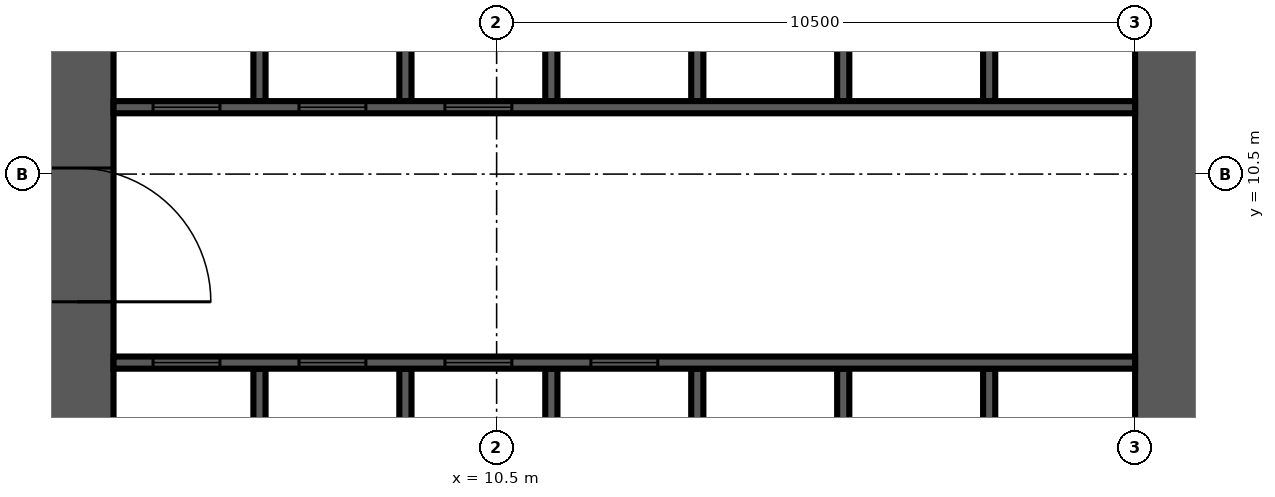
"""IFC4 building model, lengths in metres.
Left out: names, types, materials, properties, quantities, classifications, styles, units other than length and angle.
Written with IfcOpenShell. Run it as: python <this file> out.ifc"""

import sys

from ifc_helpers import new_model, si_unit, direction, frame, frame_2d, origin, place, context, subcontext, project, spatial, rectangle, extrude, source, transform, mapped, element, fill, save


model = new_model("IFC4")
c1 = context("Model", 3, precision=1e-05, world=origin(), true_north=direction((0.0, 1.0)))
c2 = subcontext(c1, "Body", "Model", "MODEL_VIEW")
j1 = project(units=[si_unit("LENGTHUNIT", "METRE"), si_unit("PLANEANGLEUNIT", "RADIAN")], contexts=[c1])
p1 = place(None, origin())
s1 = spatial("IfcSite", under=j1, at=p1, CompositionType="ELEMENT")
p2 = place(p1, origin())
s2 = spatial("IfcBuilding", under=s1, at=p2, CompositionType="ELEMENT")
p3 = place(p2, frame((0.0, 0.0, 99.3)))
s3 = spatial("IfcBuildingStorey", under=s2, at=p3, CompositionType="ELEMENT", Elevation=99.3)
m1 = source(origin(), c2, "Body", "SweptSolid", [
    extrude(rectangle(XDim=18.0, YDim=1.2, at=frame_2d((9.0, 0.0))), origin(), (0.0, 0.0, 1.0), 4.2),
])
p4 = place(p3, frame((3.6, 4.2, 0.0), z_axis=(0.0, 0.0, 1.0), x_axis=(0.0, 1.0, 0.0)))
e1 = element("IfcWall", 1, at=p4, inside=s3, PredefinedType="SHEAR", context=c2, shape_type="MappedRepresentation", body=[
    mapped(m1, transform((0.0, 0.0, 0.0), scale=1.0)),
])
m2 = source(origin(), c2, "Body", "SweptSolid", [
    extrude(rectangle(XDim=2.2, YDim=2.1, at=frame_2d((1.1, 1.05))), frame((0.0, 0.61, 0.0), z_axis=(0.0, -1.0, 0.0), x_axis=(1.0, 0.0, 0.0)), (0.0, 0.0, 1.0), 1.22),
])
p5 = place(p4, frame((4.2, 0.0, 0.0)))
e2 = element("IfcOpeningElement", 2, at=p5, cuts=e1, PredefinedType="OPENING", context=c2, shape_type="MappedRepresentation", body=[
    mapped(m2, transform((0.0, 0.0, 0.0), scale=1.0)),
])
p6 = place(p4, frame((10.95, 0.0, 0.0)))
e3 = element("IfcOpeningElement", 3, at=p6, cuts=e1, PredefinedType="OPENING", context=c2, shape_type="SweptSolid", body=[
    extrude(rectangle(XDim=0.9, YDim=2.1, at=frame_2d((0.45, 1.05))), frame((0.0, 0.61, 0.0), z_axis=(0.0, -1.0, 0.0), x_axis=(1.0, 0.0, 0.0)), (0.0, 0.0, 1.0), 1.22),
])
m3 = source(origin(), c2, "Body", "SweptSolid", [
    extrude(rectangle(XDim=16.8, YDim=1.2, at=frame_2d((8.4, 0.0))), origin(), (0.0, 0.0, 1.0), 4.2),
])
p7 = place(p3, frame((21.6, 4.2, 0.0), z_axis=(0.0, 0.0, 1.0), x_axis=(0.0, 1.0, 0.0)))
e4 = element("IfcWall", 4, at=p7, inside=s3, PredefinedType="SHEAR", context=c2, shape_type="MappedRepresentation", body=[
    mapped(m3, transform((0.0, 0.0, 0.0), scale=1.0)),
])
m4 = source(origin(), c2, "Body", "SweptSolid", [
    extrude(rectangle(XDim=1.2, YDim=2.1, at=frame_2d((0.6, 1.05))), frame((0.0, 0.61, 0.0), z_axis=(0.0, -1.0, 0.0), x_axis=(1.0, 0.0, 0.0)), (0.0, 0.0, 1.0), 1.22),
])
p8 = place(p7, frame((14.7, 0.0, 0.0)))
e5 = element("IfcOpeningElement", 5, at=p8, cuts=e4, PredefinedType="OPENING", context=c2, shape_type="MappedRepresentation", body=[
    mapped(m4, transform((0.0, 0.0, 0.0), scale=1.0)),
])
m5 = source(origin(), c2, "Body", "SweptSolid", [
    extrude(rectangle(XDim=3.1, YDim=0.2, at=frame_2d((1.55, 0.0))), origin(), (0.0, 0.0, 1.0), 4.2),
])
for number, where, z_axis, x_axis in (
    (6, (6.6, 4.2, 0.0), (0.0, 0.0, 1.0), (0.0, 1.0, 0.0)),
    (7, (9.0, 4.2, 0.0), (0.0, 0.0, 1.0), (0.0, 1.0, 0.0)),
    (8, (11.4, 4.2, 0.0), (0.0, 0.0, 1.0), (0.0, 1.0, 0.0)),
    (9, (13.8, 4.2, 0.0), (0.0, 0.0, 1.0), (0.0, 1.0, 0.0)),
    (10, (16.2, 4.2, 0.0), (0.0, 0.0, 1.0), (0.0, 1.0, 0.0)),
    (11, (18.6, 4.2, 0.0), (0.0, 0.0, 1.0), (0.0, 1.0, 0.0)),
):
    element("IfcWall", number, at=place(p3, frame(where, z_axis=z_axis, x_axis=x_axis)), inside=s3, PredefinedType="SOLIDWALL", context=c2, shape_type="MappedRepresentation", body=[
        mapped(m5, transform((0.0, 0.0, 0.0), scale=1.0)),
    ])
m6 = source(origin(), c2, "Body", "SweptSolid", [
    extrude(rectangle(XDim=3.0, YDim=0.2, at=frame_2d((1.5, 0.0))), origin(), (0.0, 0.0, 1.0), 4.2),
])
for number, where, z_axis, x_axis in (
    (12, (6.6, 11.7, 0.0), (0.0, 0.0, 1.0), (0.0, 1.0, 0.0)),
    (13, (9.0, 11.7, 0.0), (0.0, 0.0, 1.0), (0.0, 1.0, 0.0)),
    (14, (11.4, 11.7, 0.0), (0.0, 0.0, 1.0), (0.0, 1.0, 0.0)),
    (15, (13.8, 11.7, 0.0), (0.0, 0.0, 1.0), (0.0, 1.0, 0.0)),
    (16, (16.2, 11.7, 0.0), (0.0, 0.0, 1.0), (0.0, 1.0, 0.0)),
    (17, (18.6, 11.7, 0.0), (0.0, 0.0, 1.0), (0.0, 1.0, 0.0)),
):
    element("IfcWall", number, at=place(p3, frame(where, z_axis=z_axis, x_axis=x_axis)), inside=s3, PredefinedType="SOLIDWALL", context=c2, shape_type="MappedRepresentation", body=[
        mapped(m6, transform((0.0, 0.0, 0.0), scale=1.0)),
    ])
m7 = source(origin(), c2, "Body", "SweptSolid", [
    extrude(rectangle(XDim=16.8, YDim=0.2, at=frame_2d((8.4, 0.0))), origin(), (0.0, 0.0, 1.0), 4.2),
])
p9 = place(p3, frame((4.2, 7.4, 0.0), z_axis=(0.0, 0.0, 1.0), x_axis=(1.0, 0.0, 0.0)))
e18 = element("IfcWall", 18, at=p9, inside=s3, PredefinedType="SOLIDWALL", context=c2, shape_type="MappedRepresentation", body=[
    mapped(m7, transform((0.0, 0.0, 0.0), scale=1.0)),
])
m8 = source(origin(), c2, "Body", "SweptSolid", [
    extrude(rectangle(XDim=1.1, YDim=2.1, at=frame_2d((0.55, 1.05))), frame((0.0, 0.11, 0.0), z_axis=(0.0, -1.0, 0.0), x_axis=(1.0, 0.0, 0.0)), (0.0, 0.0, 1.0), 0.22),
])
p10 = place(p9, frame((0.65, 0.0, 0.0)))
e19 = element("IfcOpeningElement", 19, at=p10, cuts=e18, PredefinedType="OPENING", context=c2, shape_type="MappedRepresentation", body=[
    mapped(m8, transform((0.0, 0.0, 0.0), scale=1.0)),
])
p11 = place(p9, frame((3.05, 0.0, 0.0)))
e20 = element("IfcOpeningElement", 20, at=p11, cuts=e18, PredefinedType="OPENING", context=c2, shape_type="MappedRepresentation", body=[
    mapped(m8, transform((0.0, 0.0, 0.0), scale=1.0)),
])
p12 = place(p9, frame((5.45, 0.0, 0.0)))
e21 = element("IfcOpeningElement", 21, at=p12, cuts=e18, PredefinedType="OPENING", context=c2, shape_type="MappedRepresentation", body=[
    mapped(m8, transform((0.0, 0.0, 0.0), scale=1.0)),
])
p13 = place(p9, frame((7.85, 0.0, 0.0)))
e22 = element("IfcOpeningElement", 22, at=p13, cuts=e18, PredefinedType="OPENING", context=c2, shape_type="MappedRepresentation", body=[
    mapped(m8, transform((0.0, 0.0, 0.0), scale=1.0)),
])
p14 = place(p3, frame((4.2, 11.6, 0.0), z_axis=(0.0, 0.0, 1.0), x_axis=(1.0, 0.0, 0.0)))
e23 = element("IfcWall", 23, at=p14, inside=s3, PredefinedType="SOLIDWALL", context=c2, shape_type="MappedRepresentation", body=[
    mapped(m7, transform((0.0, 0.0, 0.0), scale=1.0)),
])
p15 = place(p14, frame((0.65, 0.0, 0.0)))
e24 = element("IfcOpeningElement", 24, at=p15, cuts=e23, PredefinedType="OPENING", context=c2, shape_type="MappedRepresentation", body=[
    mapped(m8, transform((0.0, 0.0, 0.0), scale=1.0)),
])
p16 = place(p14, frame((3.05, 0.0, 0.0)))
e25 = element("IfcOpeningElement", 25, at=p16, cuts=e23, PredefinedType="OPENING", context=c2, shape_type="MappedRepresentation", body=[
    mapped(m8, transform((0.0, 0.0, 0.0), scale=1.0)),
])
p17 = place(p14, frame((5.45, 0.0, 0.0)))
e26 = element("IfcOpeningElement", 26, at=p17, cuts=e23, PredefinedType="OPENING", context=c2, shape_type="MappedRepresentation", body=[
    mapped(m8, transform((0.0, 0.0, 0.0), scale=1.0)),
])
m9 = source(origin(), c2, "Body", "SweptSolid", [
    extrude(rectangle(XDim=1.1, YDim=2.1, at=frame_2d((0.55, 1.05))), frame((0.0, 0.025, 0.0), z_axis=(0.0, -1.0, 0.0), x_axis=(1.0, 0.0, 0.0)), (0.0, 0.0, 1.0), 0.05),
])
p18 = place(p10, origin())
e27 = element("IfcDoor", 27, at=p18, inside=s3, OperationType="SLIDING_TO_LEFT", PredefinedType="DOOR", context=c2, shape_type="MappedRepresentation", body=[
    mapped(m9, transform((0.0, 0.0, 0.0), scale=1.0)),
])
fill(e19, e27)
p19 = place(p11, origin())
e28 = element("IfcDoor", 28, at=p19, inside=s3, OperationType="SLIDING_TO_LEFT", PredefinedType="DOOR", context=c2, shape_type="MappedRepresentation", body=[
    mapped(m9, transform((0.0, 0.0, 0.0), scale=1.0)),
])
fill(e20, e28)
p20 = place(p12, origin())
e29 = element("IfcDoor", 29, at=p20, inside=s3, OperationType="SLIDING_TO_LEFT", PredefinedType="DOOR", context=c2, shape_type="MappedRepresentation", body=[
    mapped(m9, transform((0.0, 0.0, 0.0), scale=1.0)),
])
fill(e21, e29)
p21 = place(p13, origin())
e30 = element("IfcDoor", 30, at=p21, inside=s3, OperationType="SLIDING_TO_LEFT", PredefinedType="DOOR", context=c2, shape_type="MappedRepresentation", body=[
    mapped(m9, transform((0.0, 0.0, 0.0), scale=1.0)),
])
fill(e22, e30)
p22 = place(p15, origin())
e31 = element("IfcDoor", 31, at=p22, inside=s3, OperationType="SLIDING_TO_LEFT", PredefinedType="DOOR", context=c2, shape_type="MappedRepresentation", body=[
    mapped(m9, transform((0.0, 0.0, 0.0), scale=1.0)),
])
fill(e24, e31)
p23 = place(p16, origin())
e32 = element("IfcDoor", 32, at=p23, inside=s3, OperationType="SLIDING_TO_LEFT", PredefinedType="DOOR", context=c2, shape_type="MappedRepresentation", body=[
    mapped(m9, transform((0.0, 0.0, 0.0), scale=1.0)),
])
fill(e25, e32)
p24 = place(p17, origin())
e33 = element("IfcDoor", 33, at=p24, inside=s3, OperationType="SLIDING_TO_LEFT", PredefinedType="DOOR", context=c2, shape_type="MappedRepresentation", body=[
    mapped(m9, transform((0.0, 0.0, 0.0), scale=1.0)),
])
fill(e26, e33)
m10 = source(origin(), c2, "Body", "SweptSolid", [
    extrude(rectangle(XDim=2.2, YDim=2.1, at=frame_2d((1.1, 1.05))), frame((0.0, 0.025, 0.0), z_axis=(0.0, -1.0, 0.0), x_axis=(1.0, 0.0, 0.0)), (0.0, 0.0, 1.0), 0.05),
])
p25 = place(p5, origin())
e34 = element("IfcDoor", 34, at=p25, inside=s3, OperationType="DOUBLE_DOOR_SINGLE_SWING", PredefinedType="DOOR", context=c2, shape_type="MappedRepresentation", body=[
    mapped(m10, transform((0.0, 0.0, 0.0), scale=1.0)),
])
fill(e2, e34)
save(model, sys.argv[1])
